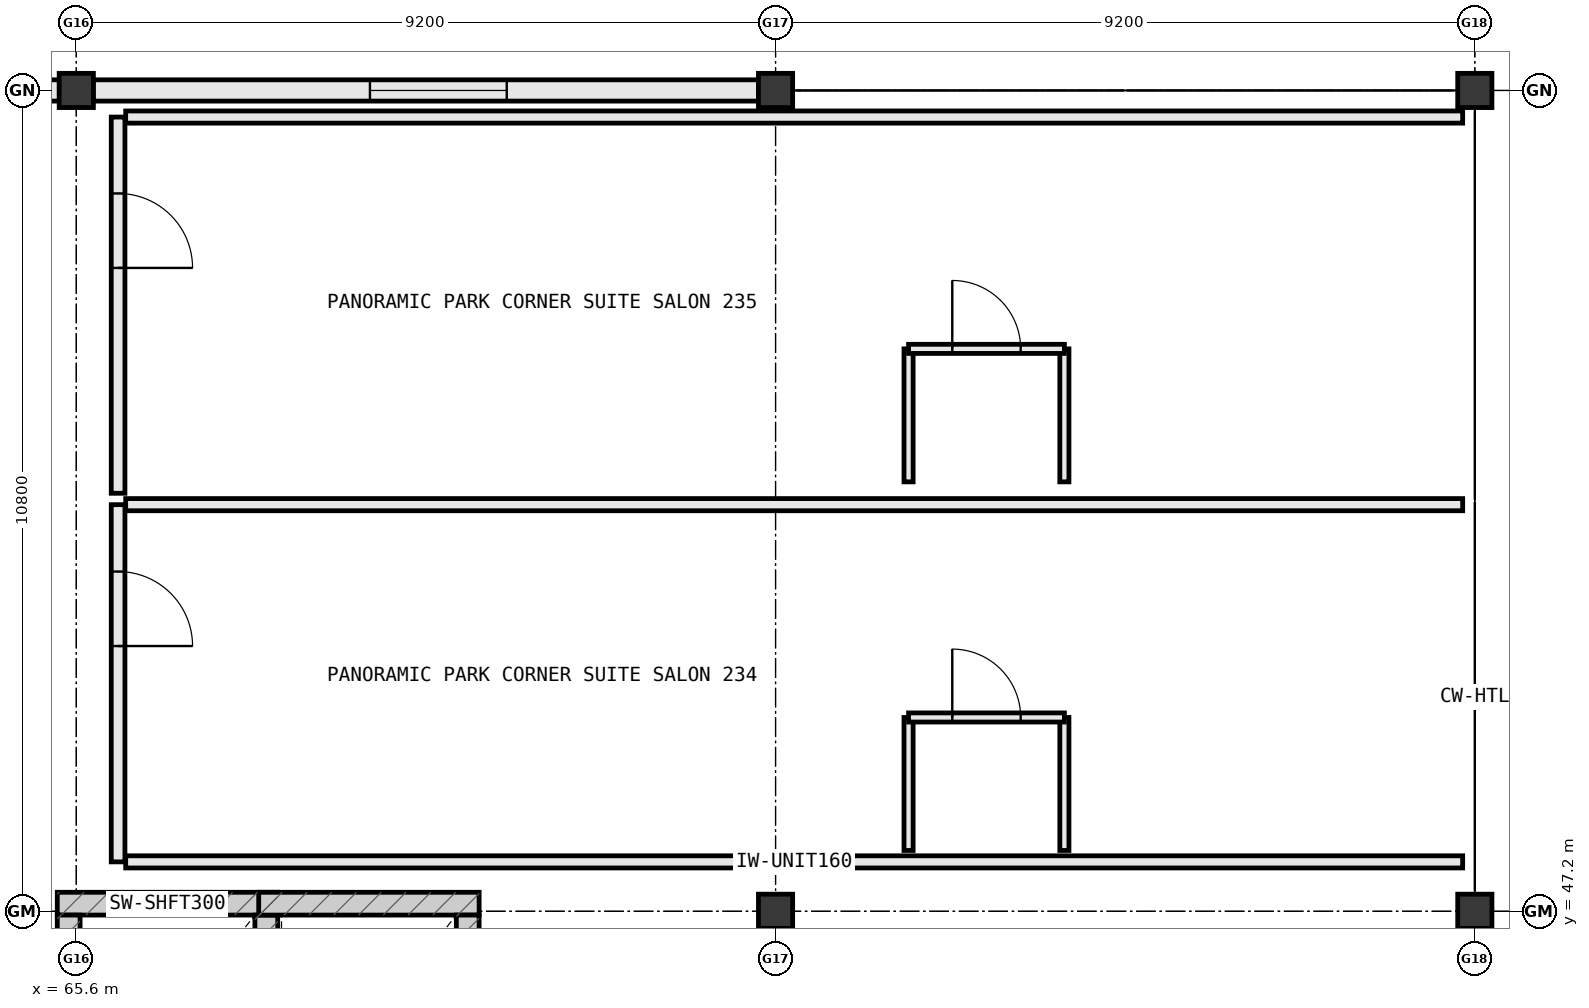
"""IFC4 building model, lengths in metres.
Left out: names, types, materials, properties, quantities, classifications, styles, units other than length and angle.
Written with IfcOpenShell. Run it as: python <this file> out.ifc"""

import sys

from ifc_helpers import new_model, si_unit, direction, frame, frame_2d, origin, origin_2d, place, context, subcontext, project, spatial, rectangle, extrude, element, fill, save


model = new_model("IFC4")
c1 = context("Model", 3, precision=1e-05, world=origin(), true_north=direction((0.0, 1.0)))
c2 = subcontext(c1, "Body", "Model", "MODEL_VIEW")
j1 = project(units=[si_unit("LENGTHUNIT", "METRE"), si_unit("PLANEANGLEUNIT", "RADIAN")], contexts=[c1])
p1 = place(None, origin())
s1 = spatial("IfcSite", under=j1, at=p1, CompositionType="ELEMENT")
p2 = place(p1, origin())
s2 = spatial("IfcBuilding", under=s1, at=p2, CompositionType="ELEMENT")
p3 = place(p2, frame((0.0, 0.0, 31.4)))
s3 = spatial("IfcBuildingStorey", under=s2, at=p3, CompositionType="ELEMENT", Elevation=31.4)
for number, where, z_axis, x_axis in (
    (1, (74.8, 47.2, 0.0), (0.0, 0.0, 1.0), (1.0, 0.0, 0.0)),
    (2, (74.8, 58.0, 0.0), (0.0, 0.0, 1.0), (1.0, 0.0, 0.0)),
    (3, (84.0, 47.2, 0.0), (0.0, 0.0, 1.0), (1.0, 0.0, 0.0)),
    (4, (84.0, 58.0, 0.0), (0.0, 0.0, 1.0), (1.0, 0.0, 0.0)),
    (5, (65.6, 58.0, 0.0), (0.0, 0.0, 1.0), (1.0, 0.0, 0.0)),
):
    element("IfcColumn", number, at=place(p3, frame(where, z_axis=z_axis, x_axis=x_axis)), inside=s3, PredefinedType="COLUMN", context=c2, shape_type="SweptSolid", body=[
        extrude(rectangle(XDim=0.45, YDim=0.45, at=origin_2d()), origin(), (0.0, 0.0, 1.0), 3.8),
    ])
p4 = place(p3, frame((74.577, 58.0, 0.0), z_axis=(0.0, 0.0, 1.0), x_axis=(-1.0, 0.0, 0.0)))
e6 = element("IfcWall", 6, at=p4, inside=s3, PredefinedType="STANDARD", context=c2, shape_type="SweptSolid", body=[
    extrude(rectangle(XDim=8.754, YDim=0.28, at=frame_2d((4.377, 0.0))), origin(), (0.0, 0.0, 1.0), 2.87),
])
p5 = place(p4, frame((3.313, 0.0, 0.85)))
e7 = element("IfcOpeningElement", 7, at=p5, cuts=e6, PredefinedType="OPENING", context=c2, shape_type="SweptSolid", body=[
    extrude(rectangle(XDim=1.8, YDim=1.85, at=frame_2d((0.9, 0.925))), frame((0.0, 0.152, 0.0), z_axis=(0.0, -1.0, 0.0), x_axis=(1.0, 0.0, 0.0)), (0.0, 0.0, 1.0), 0.304),
])
p6 = place(p3, frame((65.377, 58.0, 0.0), z_axis=(0.0, 0.0, 1.0), x_axis=(-1.0, 0.0, 0.0)))
e8 = element("IfcWall", 8, at=p6, inside=s3, PredefinedType="STANDARD", context=c2, shape_type="SweptSolid", body=[
    extrude(rectangle(XDim=4.354, YDim=0.28, at=frame_2d((2.177, 0.0))), origin(), (0.0, 0.0, 1.0), 2.87),
])
p7 = place(p6, frame((1.467, 0.0, 0.85)))
e9 = element("IfcOpeningElement", 9, at=p7, cuts=e8, PredefinedType="OPENING", context=c2, shape_type="SweptSolid", body=[
    extrude(rectangle(XDim=1.42, YDim=1.7, at=frame_2d((0.71, 0.85))), frame((0.0, 0.152, 0.0), z_axis=(0.0, -1.0, 0.0), x_axis=(1.0, 0.0, 0.0)), (0.0, 0.0, 1.0), 0.304),
])
for number, where, z_axis, x_axis in (
    (10, (68.25, 47.3, 0.0), (0.0, 0.0, 1.0), (-1.0, 0.0, 0.0)),
    (11, (68.1, 44.25, 0.0), (0.0, 0.0, 1.0), (0.0, 1.0, 0.0)),
    (12, (65.5, 47.15, 0.0), (0.0, 0.0, 1.0), (0.0, -1.0, 0.0)),
    (13, (70.9, 47.3, 0.0), (0.0, 0.0, 1.0), (-1.0, 0.0, 0.0)),
    (14, (70.75, 44.25, 0.0), (0.0, 0.0, 1.0), (0.0, 1.0, 0.0)),
):
    element("IfcWall", number, at=place(p3, frame(where, z_axis=z_axis, x_axis=x_axis)), inside=s3, PredefinedType="SHEAR", context=c2, shape_type="SweptSolid", body=[
        extrude(rectangle(XDim=2.9, YDim=0.3, at=frame_2d((1.45, 0.0))), origin(), (0.0, 0.0, 1.0), 3.8),
    ])
p8 = place(p3, frame((66.15, 52.55, 0.0), z_axis=(0.0, 0.0, 1.0), x_axis=(0.0, -1.0, 0.0)))
e15 = element("IfcWall", 15, at=p8, inside=s3, PredefinedType="PARTITIONING", context=c2, shape_type="SweptSolid", body=[
    extrude(rectangle(XDim=4.7, YDim=0.18, at=frame_2d((2.35, 0.0))), origin(), (0.0, 0.0, 1.0), 3.555),
])
p9 = place(p8, frame((0.88, 0.0, 0.0)))
e16 = element("IfcOpeningElement", 16, at=p9, cuts=e15, PredefinedType="OPENING", context=c2, shape_type="SweptSolid", body=[
    extrude(rectangle(XDim=0.98, YDim=2.18, at=frame_2d((0.49, 1.09))), frame((0.0, 0.102, 0.0), z_axis=(0.0, -1.0, 0.0), x_axis=(1.0, 0.0, 0.0)), (0.0, 0.0, 1.0), 0.204),
])
for number, where, z_axis, x_axis in (
    (17, (66.25, 47.85, 0.0), (0.0, 0.0, 1.0), (1.0, 0.0, 0.0)),
    (18, (66.25, 52.55, 0.0), (0.0, 0.0, 1.0), (1.0, 0.0, 0.0)),
):
    element("IfcWall", number, at=place(p3, frame(where, z_axis=z_axis, x_axis=x_axis)), inside=s3, PredefinedType="PARTITIONING", context=c2, shape_type="SweptSolid", body=[
        extrude(rectangle(XDim=17.59, YDim=0.16, at=frame_2d((8.795, 0.0))), origin(), (0.0, 0.0, 1.0), 3.555),
    ])
for number, where, z_axis, x_axis in (
    (19, (76.55, 48.0, 0.0), (0.0, 0.0, 1.0), (0.0, 1.0, 0.0)),
    (20, (78.6, 48.0, 0.0), (0.0, 0.0, 1.0), (0.0, 1.0, 0.0)),
):
    element("IfcWall", number, at=place(p3, frame(where, z_axis=z_axis, x_axis=x_axis)), inside=s3, PredefinedType="PARTITIONING", context=c2, shape_type="SweptSolid", body=[
        extrude(rectangle(XDim=1.75, YDim=0.12, at=frame_2d((0.875, 0.0))), origin(), (0.0, 0.0, 1.0), 3.555),
    ])
p10 = place(p3, frame((76.55, 49.75, 0.0), z_axis=(0.0, 0.0, 1.0), x_axis=(1.0, 0.0, 0.0)))
e21 = element("IfcWall", 21, at=p10, inside=s3, PredefinedType="PARTITIONING", context=c2, shape_type="SweptSolid", body=[
    extrude(rectangle(XDim=2.05, YDim=0.12, at=frame_2d((1.025, 0.0))), origin(), (0.0, 0.0, 1.0), 3.555),
])
p11 = place(p10, frame((0.575, 0.0, 0.0)))
e22 = element("IfcOpeningElement", 22, at=p11, cuts=e21, PredefinedType="OPENING", context=c2, shape_type="SweptSolid", body=[
    extrude(rectangle(XDim=0.9, YDim=2.15, at=frame_2d((0.45, 1.075))), frame((0.0, 0.072, 0.0), z_axis=(0.0, -1.0, 0.0), x_axis=(1.0, 0.0, 0.0)), (0.0, 0.0, 1.0), 0.144),
])
p12 = place(p3, frame((66.15, 57.65, 0.0), z_axis=(0.0, 0.0, 1.0), x_axis=(0.0, -1.0, 0.0)))
e23 = element("IfcWall", 23, at=p12, inside=s3, PredefinedType="PARTITIONING", context=c2, shape_type="SweptSolid", body=[
    extrude(rectangle(XDim=4.95, YDim=0.18, at=frame_2d((2.475, 0.0))), origin(), (0.0, 0.0, 1.0), 3.555),
])
p13 = place(p12, frame((1.005, 0.0, 0.0)))
e24 = element("IfcOpeningElement", 24, at=p13, cuts=e23, PredefinedType="OPENING", context=c2, shape_type="SweptSolid", body=[
    extrude(rectangle(XDim=0.98, YDim=2.18, at=frame_2d((0.49, 1.09))), frame((0.0, 0.102, 0.0), z_axis=(0.0, -1.0, 0.0), x_axis=(1.0, 0.0, 0.0)), (0.0, 0.0, 1.0), 0.204),
])
p14 = place(p3, frame((66.25, 57.65, 0.0), z_axis=(0.0, 0.0, 1.0), x_axis=(1.0, 0.0, 0.0)))
e25 = element("IfcWall", 25, at=p14, inside=s3, PredefinedType="PARTITIONING", context=c2, shape_type="SweptSolid", body=[
    extrude(rectangle(XDim=17.59, YDim=0.16, at=frame_2d((8.795, 0.0))), origin(), (0.0, 0.0, 1.0), 2.87),
])
for number, where, z_axis, x_axis in (
    (26, (76.55, 52.85, 0.0), (0.0, 0.0, 1.0), (0.0, 1.0, 0.0)),
    (27, (78.6, 52.85, 0.0), (0.0, 0.0, 1.0), (0.0, 1.0, 0.0)),
):
    element("IfcWall", number, at=place(p3, frame(where, z_axis=z_axis, x_axis=x_axis)), inside=s3, PredefinedType="PARTITIONING", context=c2, shape_type="SweptSolid", body=[
        extrude(rectangle(XDim=1.75, YDim=0.12, at=frame_2d((0.875, 0.0))), origin(), (0.0, 0.0, 1.0), 3.555),
    ])
p15 = place(p3, frame((76.55, 54.6, 0.0), z_axis=(0.0, 0.0, 1.0), x_axis=(1.0, 0.0, 0.0)))
e28 = element("IfcWall", 28, at=p15, inside=s3, PredefinedType="PARTITIONING", context=c2, shape_type="SweptSolid", body=[
    extrude(rectangle(XDim=2.05, YDim=0.12, at=frame_2d((1.025, 0.0))), origin(), (0.0, 0.0, 1.0), 3.555),
])
p16 = place(p15, frame((0.575, 0.0, 0.0)))
e29 = element("IfcOpeningElement", 29, at=p16, cuts=e28, PredefinedType="OPENING", context=c2, shape_type="SweptSolid", body=[
    extrude(rectangle(XDim=0.9, YDim=2.15, at=frame_2d((0.45, 1.075))), frame((0.0, 0.072, 0.0), z_axis=(0.0, -1.0, 0.0), x_axis=(1.0, 0.0, 0.0)), (0.0, 0.0, 1.0), 0.144),
])
p17 = place(p5, origin())
e30 = element("IfcWindow", 30, at=p17, inside=s3, PartitioningType="SINGLE_PANEL", PredefinedType="WINDOW", context=c2, shape_type="SweptSolid", body=[
    extrude(rectangle(XDim=1.8, YDim=1.85, at=frame_2d((0.9, 0.925))), frame((0.0, 0.03, 0.0), z_axis=(0.0, -1.0, 0.0), x_axis=(1.0, 0.0, 0.0)), (0.0, 0.0, 1.0), 0.06),
])
fill(e7, e30)
p18 = place(p9, origin())
e31 = element("IfcDoor", 31, at=p18, inside=s3, OperationType="SINGLE_SWING_RIGHT", PredefinedType="DOOR", context=c2, shape_type="SweptSolid", body=[
    extrude(rectangle(XDim=0.98, YDim=2.18, at=frame_2d((0.49, 1.09))), frame((0.0, 0.025, 0.0), z_axis=(0.0, -1.0, 0.0), x_axis=(1.0, 0.0, 0.0)), (0.0, 0.0, 1.0), 0.05),
])
fill(e16, e31)
p19 = place(p11, origin())
e32 = element("IfcDoor", 32, at=p19, inside=s3, OperationType="SINGLE_SWING_LEFT", PredefinedType="DOOR", context=c2, shape_type="SweptSolid", body=[
    extrude(rectangle(XDim=0.9, YDim=2.15, at=frame_2d((0.45, 1.075))), frame((0.0, 0.025, 0.0), z_axis=(0.0, -1.0, 0.0), x_axis=(1.0, 0.0, 0.0)), (0.0, 0.0, 1.0), 0.05),
])
fill(e22, e32)
p20 = place(p13, origin())
e33 = element("IfcDoor", 33, at=p20, inside=s3, OperationType="SINGLE_SWING_RIGHT", PredefinedType="DOOR", context=c2, shape_type="SweptSolid", body=[
    extrude(rectangle(XDim=0.98, YDim=2.18, at=frame_2d((0.49, 1.09))), frame((0.0, 0.025, 0.0), z_axis=(0.0, -1.0, 0.0), x_axis=(1.0, 0.0, 0.0)), (0.0, 0.0, 1.0), 0.05),
])
fill(e24, e33)
p21 = place(p16, origin())
e34 = element("IfcDoor", 34, at=p21, inside=s3, OperationType="SINGLE_SWING_LEFT", PredefinedType="DOOR", context=c2, shape_type="SweptSolid", body=[
    extrude(rectangle(XDim=0.9, YDim=2.15, at=frame_2d((0.45, 1.075))), frame((0.0, 0.025, 0.0), z_axis=(0.0, -1.0, 0.0), x_axis=(1.0, 0.0, 0.0)), (0.0, 0.0, 1.0), 0.05),
])
fill(e29, e34)
save(model, sys.argv[1])
